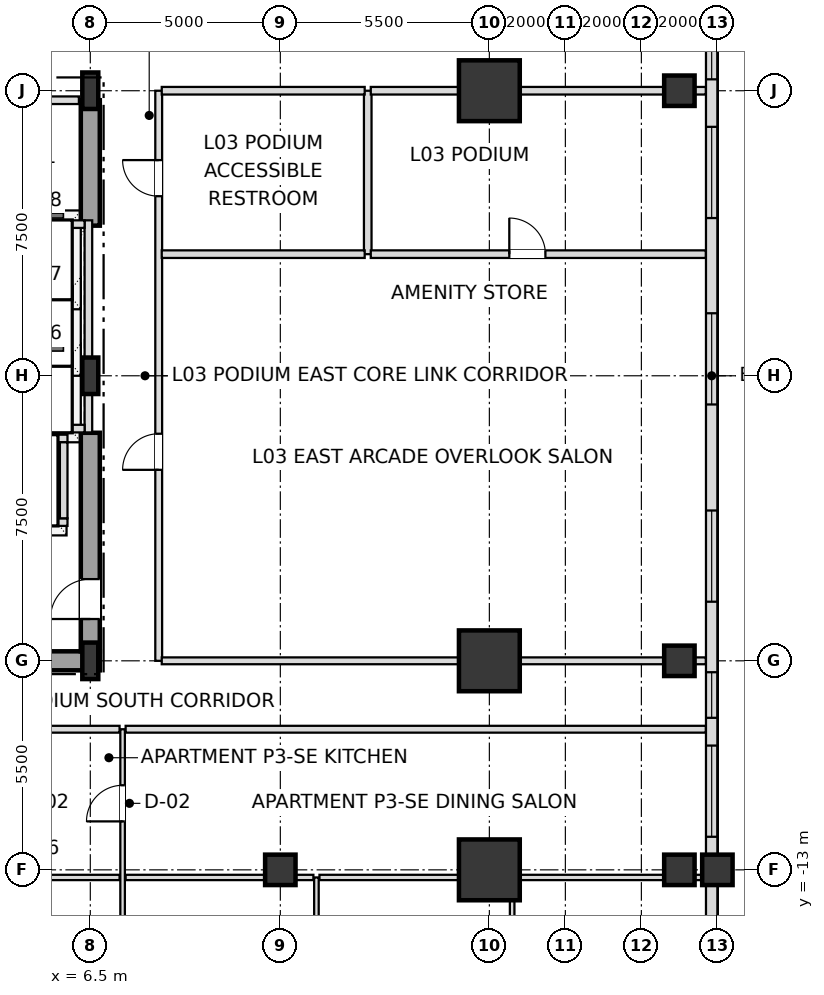
"""IFC4 building model, lengths in metres.
Left out: names, types, materials, properties, quantities, classifications, styles, units other than length and angle.
Written with IfcOpenShell. Run it as: python <this file> out.ifc"""

import sys

from ifc_helpers import new_model, si_unit, direction, frame, frame_2d, origin, origin_2d, place, context, subcontext, project, spatial, rectangle, i_section, extrude, element, fill, save


model = new_model("IFC4")
c1 = context("Model", 3, precision=1e-05, world=origin(), true_north=direction((0.0, 1.0)))
c2 = subcontext(c1, "Body", "Model", "MODEL_VIEW")
j1 = project(units=[si_unit("LENGTHUNIT", "METRE"), si_unit("PLANEANGLEUNIT", "RADIAN")], contexts=[c1])
p1 = place(None, origin())
s1 = spatial("IfcSite", under=j1, at=p1, CompositionType="ELEMENT")
p2 = place(p1, origin())
s2 = spatial("IfcBuilding", under=s1, at=p2, CompositionType="ELEMENT")
p3 = place(p2, frame((0.0, 0.0, 16.8)))
s3 = spatial("IfcBuildingStorey", under=s2, at=p3, CompositionType="ELEMENT", Elevation=16.8)
for number, where, z_axis, x_axis in (
    (1, (6.5, -7.5, 0.0), (0.0, 0.0, 1.0), (1.0, 0.0, 0.0)),
    (2, (6.5, 0.0, 0.0), (0.0, 0.0, 1.0), (1.0, 0.0, 0.0)),
    (3, (6.5, 7.5, 0.0), (0.0, 0.0, 1.0), (1.0, 0.0, 0.0)),
):
    element("IfcColumn", number, at=place(p3, frame(where, z_axis=z_axis, x_axis=x_axis)), inside=s3, PredefinedType="COLUMN", context=c2, shape_type="SweptSolid", body=[
        extrude(i_section(OverallWidth=0.42, OverallDepth=0.96, WebThickness=0.022, FlangeThickness=0.034, at=origin_2d()), origin(), (0.0, 0.0, 1.0), 5.4),
    ])
for number, where, z_axis, x_axis in (
    (4, (17.0, -13.0, 0.0), (0.0, 0.0, 1.0), (1.0, 0.0, 0.0)),
    (5, (17.0, -7.5, 0.0), (0.0, 0.0, 1.0), (1.0, 0.0, 0.0)),
    (6, (17.0, 7.5, 0.0), (0.0, 0.0, 1.0), (1.0, 0.0, 0.0)),
):
    element("IfcColumn", number, at=place(p3, frame(where, z_axis=z_axis, x_axis=x_axis)), inside=s3, PredefinedType="USERDEFINED", context=c2, shape_type="SweptSolid", body=[
        extrude(rectangle(XDim=1.6, YDim=1.6, at=origin_2d()), origin(), (0.0, 0.0, 1.0), 5.4),
    ])
for number, where, z_axis, x_axis in (
    (7, (23.0, -13.0, 0.0), (0.0, 0.0, 1.0), (1.0, 0.0, 0.0)),
    (8, (11.5, -13.0, 0.0), (0.0, 0.0, 1.0), (1.0, 0.0, 0.0)),
    (9, (22.0, -13.0, 0.0), (0.0, 0.0, 1.0), (1.0, 0.0, 0.0)),
    (10, (22.0, -7.5, 0.0), (0.0, 0.0, 1.0), (1.0, 0.0, 0.0)),
    (11, (22.0, 7.5, 0.0), (0.0, 0.0, 1.0), (1.0, 0.0, 0.0)),
):
    element("IfcColumn", number, at=place(p3, frame(where, z_axis=z_axis, x_axis=x_axis)), inside=s3, PredefinedType="COLUMN", context=c2, shape_type="SweptSolid", body=[
        extrude(rectangle(XDim=0.8, YDim=0.8, at=origin_2d()), origin(), (0.0, 0.0, 1.0), 5.4),
    ])
p4 = place(p3, frame((22.85, -19.35, 0.0), z_axis=(0.0, 0.0, 1.0), x_axis=(0.0, 1.0, 0.0)))
e12 = element("IfcWall", 12, at=p4, inside=s3, PredefinedType="SOLIDWALL", context=c2, shape_type="SweptSolid", body=[
    extrude(rectangle(XDim=38.7, YDim=0.3, at=frame_2d((19.35, 0.0))), origin(), (0.0, 0.0, 1.0), 4.476),
])
p5 = place(p4, frame((1.83, 0.0, 0.8)))
e13 = element("IfcOpeningElement", 13, at=p5, cuts=e12, PredefinedType="OPENING", context=c2, shape_type="SweptSolid", body=[
    extrude(rectangle(XDim=2.4, YDim=2.2, at=frame_2d((1.2, 1.1))), frame((0.0, 0.16, 0.0), z_axis=(0.0, -1.0, 0.0), x_axis=(1.0, 0.0, 0.0)), (0.0, 0.0, 1.0), 0.32),
])
p6 = place(p4, frame((7.22, 0.0, 0.8)))
e14 = element("IfcOpeningElement", 14, at=p6, cuts=e12, PredefinedType="OPENING", context=c2, shape_type="SweptSolid", body=[
    extrude(rectangle(XDim=2.4, YDim=2.2, at=frame_2d((1.2, 1.1))), frame((0.0, 0.16, 0.0), z_axis=(0.0, -1.0, 0.0), x_axis=(1.0, 0.0, 0.0)), (0.0, 0.0, 1.0), 0.32),
])
p7 = place(p4, frame((10.35, 0.0, 0.72)))
e15 = element("IfcOpeningElement", 15, at=p7, cuts=e12, PredefinedType="OPENING", context=c2, shape_type="SweptSolid", body=[
    extrude(rectangle(XDim=1.2, YDim=1.68, at=frame_2d((0.6, 0.84))), frame((0.0, 0.16, 0.0), z_axis=(0.0, -1.0, 0.0), x_axis=(1.0, 0.0, 0.0)), (0.0, 0.0, 1.0), 0.32),
])
p8 = place(p4, frame((13.405, 0.0, 0.8)))
e16 = element("IfcOpeningElement", 16, at=p8, cuts=e12, PredefinedType="OPENING", context=c2, shape_type="SweptSolid", body=[
    extrude(rectangle(XDim=2.4, YDim=2.2, at=frame_2d((1.2, 1.1))), frame((0.0, 0.16, 0.0), z_axis=(0.0, -1.0, 0.0), x_axis=(1.0, 0.0, 0.0)), (0.0, 0.0, 1.0), 0.32),
])
p9 = place(p4, frame((18.595, 0.0, 0.8)))
e17 = element("IfcOpeningElement", 17, at=p9, cuts=e12, PredefinedType="OPENING", context=c2, shape_type="SweptSolid", body=[
    extrude(rectangle(XDim=2.4, YDim=2.2, at=frame_2d((1.2, 1.1))), frame((0.0, 0.16, 0.0), z_axis=(0.0, -1.0, 0.0), x_axis=(1.0, 0.0, 0.0)), (0.0, 0.0, 1.0), 0.32),
])
p10 = place(p4, frame((23.5, 0.0, 0.8)))
e18 = element("IfcOpeningElement", 18, at=p10, cuts=e12, PredefinedType="OPENING", context=c2, shape_type="SweptSolid", body=[
    extrude(rectangle(XDim=2.4, YDim=2.2, at=frame_2d((1.2, 1.1))), frame((0.0, 0.16, 0.0), z_axis=(0.0, -1.0, 0.0), x_axis=(1.0, 0.0, 0.0)), (0.0, 0.0, 1.0), 0.32),
])
p11 = place(p4, frame((27.15, 0.0, 0.72)))
e19 = element("IfcOpeningElement", 19, at=p11, cuts=e12, PredefinedType="OPENING", context=c2, shape_type="SweptSolid", body=[
    extrude(rectangle(XDim=1.2, YDim=1.68, at=frame_2d((0.6, 0.84))), frame((0.0, 0.16, 0.0), z_axis=(0.0, -1.0, 0.0), x_axis=(1.0, 0.0, 0.0)), (0.0, 0.0, 1.0), 0.32),
])
p12 = place(p4, frame((29.08, 0.0, 0.8)))
e20 = element("IfcOpeningElement", 20, at=p12, cuts=e12, PredefinedType="OPENING", context=c2, shape_type="SweptSolid", body=[
    extrude(rectangle(XDim=2.4, YDim=2.2, at=frame_2d((1.2, 1.1))), frame((0.0, 0.16, 0.0), z_axis=(0.0, -1.0, 0.0), x_axis=(1.0, 0.0, 0.0)), (0.0, 0.0, 1.0), 0.32),
])
p13 = place(p4, frame((34.47, 0.0, 0.8)))
e21 = element("IfcOpeningElement", 21, at=p13, cuts=e12, PredefinedType="OPENING", context=c2, shape_type="SweptSolid", body=[
    extrude(rectangle(XDim=2.4, YDim=2.2, at=frame_2d((1.2, 1.1))), frame((0.0, 0.16, 0.0), z_axis=(0.0, -1.0, 0.0), x_axis=(1.0, 0.0, 0.0)), (0.0, 0.0, 1.0), 0.32),
])
p14 = place(p3, frame((0.0, -7.5, 0.0), z_axis=(0.0, 0.0, 1.0), x_axis=(1.0, 0.0, 0.0)))
e22 = element("IfcWall", 22, at=p14, inside=s3, PredefinedType="SHEAR", context=c2, shape_type="SweptSolid", body=[
    extrude(rectangle(XDim=6.75, YDim=0.5, at=frame_2d((3.375, 0.0))), origin(), (0.0, 0.0, 1.0), 5.12),
])
p15 = place(p3, frame((6.5, -7.25, 0.0), z_axis=(0.0, 0.0, 1.0), x_axis=(0.0, 1.0, 0.0)))
e23 = element("IfcWall", 23, at=p15, inside=s3, PredefinedType="SHEAR", context=c2, shape_type="SweptSolid", body=[
    extrude(rectangle(XDim=5.75, YDim=0.5, at=frame_2d((2.875, 0.0))), origin(), (0.0, 0.0, 1.0), 5.12),
])
p16 = place(p15, frame((0.85, 0.0, 0.0)))
e24 = element("IfcOpeningElement", 24, at=p16, cuts=e23, PredefinedType="OPENING", context=c2, shape_type="SweptSolid", body=[
    extrude(rectangle(XDim=1.05, YDim=2.15, at=frame_2d((0.525, 1.075))), frame((0.0, 0.26, 0.0), z_axis=(0.0, -1.0, 0.0), x_axis=(1.0, 0.0, 0.0)), (0.0, 0.0, 1.0), 0.52),
])
p17 = place(p3, frame((6.5, 3.95, 0.0), z_axis=(0.0, 0.0, 1.0), x_axis=(0.0, 1.0, 0.0)))
e25 = element("IfcWall", 25, at=p17, inside=s3, PredefinedType="SHEAR", context=c2, shape_type="SweptSolid", body=[
    extrude(rectangle(XDim=3.3, YDim=0.5, at=frame_2d((1.65, 0.0))), origin(), (0.0, 0.0, 1.0), 5.12),
])
p18 = place(p3, frame((6.45, -1.49, 0.0), z_axis=(0.0, 0.0, 1.0), x_axis=(0.0, 1.0, 0.0)))
e26 = element("IfcWall", 26, at=p18, inside=s3, PredefinedType="SOLIDWALL", context=c2, shape_type="SweptSolid", body=[
    extrude(rectangle(XDim=5.58, YDim=0.2, at=frame_2d((2.79, 0.0))), origin(), (0.0, 0.0, 1.0), 4.41),
])
for number, where, z_axis, x_axis in (
    (27, (4.15, -1.39, 0.0), (0.0, 0.0, 1.0), (1.0, 0.0, 0.0)),
    (28, (4.15, 3.99, 0.0), (0.0, 0.0, 1.0), (1.0, 0.0, 0.0)),
):
    element("IfcWall", number, at=place(p3, frame(where, z_axis=z_axis, x_axis=x_axis)), inside=s3, PredefinedType="SOLIDWALL", context=c2, shape_type="SweptSolid", body=[
        extrude(rectangle(XDim=2.2, YDim=0.2, at=frame_2d((1.1, 0.0))), origin(), (0.0, 0.0, 1.0), 5.12),
    ])
p19 = place(p3, frame((1.8, -3.85, 0.0), z_axis=(0.0, 0.0, 1.0), x_axis=(1.0, 0.0, 0.0)))
e29 = element("IfcWall", 29, at=p19, inside=s3, PredefinedType="SOLIDWALL", context=c2, shape_type="SweptSolid", body=[
    extrude(rectangle(XDim=4.1, YDim=0.2, at=frame_2d((2.05, 0.0))), origin(), (0.0, 0.0, 1.0), 5.12),
])
p20 = place(p19, frame((0.45, 0.0, 0.0)))
e30 = element("IfcOpeningElement", 30, at=p20, cuts=e29, PredefinedType="OPENING", context=c2, shape_type="SweptSolid", body=[
    extrude(rectangle(XDim=1.2, YDim=2.2, at=frame_2d((0.6, 1.1))), frame((0.0, 0.11, 0.0), z_axis=(0.0, -1.0, 0.0), x_axis=(1.0, 0.0, 0.0)), (0.0, 0.0, 1.0), 0.22),
])
p21 = place(p19, frame((2.45, 0.0, 0.0)))
e31 = element("IfcOpeningElement", 31, at=p21, cuts=e29, PredefinedType="OPENING", context=c2, shape_type="SweptSolid", body=[
    extrude(rectangle(XDim=1.2, YDim=2.2, at=frame_2d((0.6, 1.1))), frame((0.0, 0.11, 0.0), z_axis=(0.0, -1.0, 0.0), x_axis=(1.0, 0.0, 0.0)), (0.0, 0.0, 1.0), 0.22),
])
p22 = place(p3, frame((1.8, -1.65, 0.0), z_axis=(0.0, 0.0, 1.0), x_axis=(1.0, 0.0, 0.0)))
e32 = element("IfcWall", 32, at=p22, inside=s3, PredefinedType="SOLIDWALL", context=c2, shape_type="SweptSolid", body=[
    extrude(rectangle(XDim=4.1, YDim=0.2, at=frame_2d((2.05, 0.0))), origin(), (0.0, 0.0, 1.0), 5.12),
])
p23 = place(p3, frame((5.8, -3.75, 0.0), z_axis=(0.0, 0.0, 1.0), x_axis=(0.0, 1.0, 0.0)))
e33 = element("IfcWall", 33, at=p23, inside=s3, PredefinedType="SOLIDWALL", context=c2, shape_type="SweptSolid", body=[
    extrude(rectangle(XDim=2.0, YDim=0.2, at=frame_2d((1.0, 0.0))), origin(), (0.0, 0.0, 1.0), 5.12),
])
p24 = place(p3, frame((7.35, -19.22, 0.0), z_axis=(0.0, 0.0, 1.0), x_axis=(0.0, 1.0, 0.0)))
e34 = element("IfcWall", 34, at=p24, inside=s3, PredefinedType="PARTITIONING", context=c2, shape_type="SweptSolid", body=[
    extrude(rectangle(XDim=9.92, YDim=0.12, at=frame_2d((4.96, 0.0))), origin(), (0.0, 0.0, 1.0), 4.41),
])
p25 = place(p24, frame((7.495, 0.0, 0.0)))
e35 = element("IfcOpeningElement", 35, at=p25, cuts=e34, PredefinedType="OPENING", context=c2, shape_type="SweptSolid", body=[
    extrude(rectangle(XDim=0.95, YDim=2.1, at=frame_2d((0.475, 1.05))), frame((0.0, 0.07, 0.0), z_axis=(0.0, -1.0, 0.0), x_axis=(1.0, 0.0, 0.0)), (0.0, 0.0, 1.0), 0.14),
])
p26 = place(p24, frame((2.57, 0.0, 0.0)))
e36 = element("IfcOpeningElement", 36, at=p26, cuts=e34, PredefinedType="OPENING", context=c2, shape_type="SweptSolid", body=[
    extrude(rectangle(XDim=0.9, YDim=2.1, at=frame_2d((0.45, 1.05))), frame((0.0, 0.07, 0.0), z_axis=(0.0, -1.0, 0.0), x_axis=(1.0, 0.0, 0.0)), (0.0, 0.0, 1.0), 0.14),
])
p27 = place(p3, frame((8.3, -7.5, 0.0), z_axis=(0.0, 0.0, 1.0), x_axis=(0.0, 1.0, 0.0)))
e37 = element("IfcWall", 37, at=p27, inside=s3, PredefinedType="PARTITIONING", context=c2, shape_type="SweptSolid", body=[
    extrude(rectangle(XDim=15.0, YDim=0.18, at=frame_2d((7.5, 0.0))), origin(), (0.0, 0.0, 1.0), 5.12),
])
p28 = place(p27, frame((5.025, 0.0, 0.0)))
e38 = element("IfcOpeningElement", 38, at=p28, cuts=e37, PredefinedType="OPENING", context=c2, shape_type="SweptSolid", body=[
    extrude(rectangle(XDim=0.95, YDim=2.15, at=frame_2d((0.475, 1.075))), frame((0.0, 0.1, 0.0), z_axis=(0.0, -1.0, 0.0), x_axis=(1.0, 0.0, 0.0)), (0.0, 0.0, 1.0), 0.2),
])
p29 = place(p27, frame((12.225, 0.0, 0.0)))
e39 = element("IfcOpeningElement", 39, at=p29, cuts=e37, PredefinedType="OPENING", context=c2, shape_type="SweptSolid", body=[
    extrude(rectangle(XDim=0.95, YDim=2.15, at=frame_2d((0.475, 1.075))), frame((0.0, 0.1, 0.0), z_axis=(0.0, -1.0, 0.0), x_axis=(1.0, 0.0, 0.0)), (0.0, 0.0, 1.0), 0.2),
])
p30 = place(p3, frame((12.45, -19.195, 0.0), z_axis=(0.0, 0.0, 1.0), x_axis=(0.0, 1.0, 0.0)))
e40 = element("IfcWall", 40, at=p30, inside=s3, PredefinedType="PARTITIONING", context=c2, shape_type="SweptSolid", body=[
    extrude(rectangle(XDim=5.995, YDim=0.12, at=frame_2d((2.998, 0.0))), origin(), (0.0, 0.0, 1.0), 5.12),
])
p31 = place(p30, frame((2.545, 0.0, 0.0)))
e41 = element("IfcOpeningElement", 41, at=p31, cuts=e40, PredefinedType="OPENING", context=c2, shape_type="SweptSolid", body=[
    extrude(rectangle(XDim=0.9, YDim=2.1, at=frame_2d((0.45, 1.05))), frame((0.0, 0.07, 0.0), z_axis=(0.0, -1.0, 0.0), x_axis=(1.0, 0.0, 0.0)), (0.0, 0.0, 1.0), 0.14),
])
p32 = place(p3, frame((13.8, 3.2, 0.0), z_axis=(0.0, 0.0, 1.0), x_axis=(0.0, 1.0, 0.0)))
e42 = element("IfcWall", 42, at=p32, inside=s3, PredefinedType="SOLIDWALL", context=c2, shape_type="SweptSolid", body=[
    extrude(rectangle(XDim=4.3, YDim=0.2, at=frame_2d((2.15, 0.0))), origin(), (0.0, 0.0, 1.0), 5.12),
])
p33 = place(p3, frame((17.6, -19.195, 0.0), z_axis=(0.0, 0.0, 1.0), x_axis=(0.0, 1.0, 0.0)))
e43 = element("IfcWall", 43, at=p33, inside=s3, PredefinedType="PARTITIONING", context=c2, shape_type="SweptSolid", body=[
    extrude(rectangle(XDim=5.995, YDim=0.12, at=frame_2d((2.998, 0.0))), origin(), (0.0, 0.0, 1.0), 5.12),
])
p34 = place(p33, frame((2.545, 0.0, 0.0)))
e44 = element("IfcOpeningElement", 44, at=p34, cuts=e43, PredefinedType="OPENING", context=c2, shape_type="SweptSolid", body=[
    extrude(rectangle(XDim=0.9, YDim=2.1, at=frame_2d((0.45, 1.05))), frame((0.0, 0.07, 0.0), z_axis=(0.0, -1.0, 0.0), x_axis=(1.0, 0.0, 0.0)), (0.0, 0.0, 1.0), 0.14),
])
p35 = place(p3, frame((4.23, -13.2, 0.0), z_axis=(0.0, 0.0, 1.0), x_axis=(1.0, 0.0, 0.0)))
e45 = element("IfcWall", 45, at=p35, inside=s3, PredefinedType="PARTITIONING", context=c2, shape_type="SweptSolid", body=[
    extrude(rectangle(XDim=3.04, YDim=0.14, at=frame_2d((1.52, 0.0))), origin(), (0.0, 0.0, 1.0), 4.41),
])
p36 = place(p3, frame((7.43, -13.2, 0.0), z_axis=(0.0, 0.0, 1.0), x_axis=(1.0, 0.0, 0.0)))
e46 = element("IfcWall", 46, at=p36, inside=s3, PredefinedType="PARTITIONING", context=c2, shape_type="SweptSolid", body=[
    extrude(rectangle(XDim=4.94, YDim=0.14, at=frame_2d((2.47, 0.0))), origin(), (0.0, 0.0, 1.0), 4.41),
])
p37 = place(p3, frame((12.53, -13.2, 0.0), z_axis=(0.0, 0.0, 1.0), x_axis=(1.0, 0.0, 0.0)))
e47 = element("IfcWall", 47, at=p37, inside=s3, PredefinedType="PARTITIONING", context=c2, shape_type="SweptSolid", body=[
    extrude(rectangle(XDim=4.99, YDim=0.14, at=frame_2d((2.495, 0.0))), origin(), (0.0, 0.0, 1.0), 4.41),
])
p38 = place(p3, frame((17.68, -13.2, 0.0), z_axis=(0.0, 0.0, 1.0), x_axis=(1.0, 0.0, 0.0)))
e48 = element("IfcWall", 48, at=p38, inside=s3, PredefinedType="PARTITIONING", context=c2, shape_type="SweptSolid", body=[
    extrude(rectangle(XDim=5.015, YDim=0.14, at=frame_2d((2.508, 0.0))), origin(), (0.0, 0.0, 1.0), 5.12),
])
p39 = place(p3, frame((4.23, -9.3, 0.0), z_axis=(0.0, 0.0, 1.0), x_axis=(1.0, 0.0, 0.0)))
e49 = element("IfcWall", 49, at=p39, inside=s3, PredefinedType="PARTITIONING", context=c2, shape_type="SweptSolid", body=[
    extrude(rectangle(XDim=3.04, YDim=0.18, at=frame_2d((1.52, 0.0))), origin(), (0.0, 0.0, 1.0), 4.41),
])
p40 = place(p3, frame((7.43, -9.3, 0.0), z_axis=(0.0, 0.0, 1.0), x_axis=(1.0, 0.0, 0.0)))
e50 = element("IfcWall", 50, at=p40, inside=s3, PredefinedType="PARTITIONING", context=c2, shape_type="SweptSolid", body=[
    extrude(rectangle(XDim=15.265, YDim=0.18, at=frame_2d((7.633, 0.0))), origin(), (0.0, 0.0, 1.0), 4.41),
])
p41 = place(p3, frame((8.38, -7.5, 0.0), z_axis=(0.0, 0.0, 1.0), x_axis=(1.0, 0.0, 0.0)))
e51 = element("IfcWall", 51, at=p41, inside=s3, PredefinedType="PARTITIONING", context=c2, shape_type="SweptSolid", body=[
    extrude(rectangle(XDim=14.315, YDim=0.18, at=frame_2d((7.158, 0.0))), origin(), (0.0, 0.0, 1.0), 4.41),
])
p42 = place(p3, frame((8.38, 3.2, 0.0), z_axis=(0.0, 0.0, 1.0), x_axis=(1.0, 0.0, 0.0)))
e52 = element("IfcWall", 52, at=p42, inside=s3, PredefinedType="SOLIDWALL", context=c2, shape_type="SweptSolid", body=[
    extrude(rectangle(XDim=5.34, YDim=0.2, at=frame_2d((2.67, 0.0))), origin(), (0.0, 0.0, 1.0), 4.642),
])
p43 = place(p3, frame((13.88, 3.2, 0.0), z_axis=(0.0, 0.0, 1.0), x_axis=(1.0, 0.0, 0.0)))
e53 = element("IfcWall", 53, at=p43, inside=s3, PredefinedType="SOLIDWALL", context=c2, shape_type="SweptSolid", body=[
    extrude(rectangle(XDim=8.815, YDim=0.2, at=frame_2d((4.408, 0.0))), origin(), (0.0, 0.0, 1.0), 4.41),
])
p44 = place(p43, frame((3.645, 0.0, 0.0)))
e54 = element("IfcOpeningElement", 54, at=p44, cuts=e53, PredefinedType="OPENING", context=c2, shape_type="SweptSolid", body=[
    extrude(rectangle(XDim=0.95, YDim=2.15, at=frame_2d((0.475, 1.075))), frame((0.0, 0.11, 0.0), z_axis=(0.0, -1.0, 0.0), x_axis=(1.0, 0.0, 0.0)), (0.0, 0.0, 1.0), 0.22),
])
p45 = place(p3, frame((4.13, 7.25, 0.0), z_axis=(0.0, 0.0, 1.0), x_axis=(1.0, 0.0, 0.0)))
e55 = element("IfcWall", 55, at=p45, inside=s3, PredefinedType="SOLIDWALL", context=c2, shape_type="SweptSolid", body=[
    extrude(rectangle(XDim=2.07, YDim=0.2, at=frame_2d((1.035, 0.0))), origin(), (0.0, 0.0, 1.0), 4.41),
])
p46 = place(p3, frame((8.38, 7.5, 0.0), z_axis=(0.0, 0.0, 1.0), x_axis=(1.0, 0.0, 0.0)))
e56 = element("IfcWall", 56, at=p46, inside=s3, PredefinedType="SOLIDWALL", context=c2, shape_type="SweptSolid", body=[
    extrude(rectangle(XDim=5.34, YDim=0.2, at=frame_2d((2.67, 0.0))), origin(), (0.0, 0.0, 1.0), 4.41),
])
p47 = place(p3, frame((13.88, 7.5, 0.0), z_axis=(0.0, 0.0, 1.0), x_axis=(1.0, 0.0, 0.0)))
e57 = element("IfcWall", 57, at=p47, inside=s3, PredefinedType="SOLIDWALL", context=c2, shape_type="SweptSolid", body=[
    extrude(rectangle(XDim=8.815, YDim=0.2, at=frame_2d((4.408, 0.0))), origin(), (0.0, 0.0, 1.0), 4.41),
])
p48 = place(p6, origin())
e58 = element("IfcWindow", 58, at=p48, inside=s3, PartitioningType="SINGLE_PANEL", PredefinedType="WINDOW", context=c2, shape_type="SweptSolid", body=[
    extrude(rectangle(XDim=2.4, YDim=2.2, at=frame_2d((1.2, 1.1))), frame((0.0, 0.03, 0.0), z_axis=(0.0, -1.0, 0.0), x_axis=(1.0, 0.0, 0.0)), (0.0, 0.0, 1.0), 0.06),
])
fill(e14, e58)
p49 = place(p7, origin())
e59 = element("IfcWindow", 59, at=p49, inside=s3, PartitioningType="SINGLE_PANEL", PredefinedType="WINDOW", context=c2, shape_type="SweptSolid", body=[
    extrude(rectangle(XDim=1.2, YDim=1.68, at=frame_2d((0.6, 0.84))), frame((0.0, 0.03, 0.0), z_axis=(0.0, -1.0, 0.0), x_axis=(1.0, 0.0, 0.0)), (0.0, 0.0, 1.0), 0.06),
])
fill(e15, e59)
p50 = place(p8, origin())
e60 = element("IfcWindow", 60, at=p50, inside=s3, PartitioningType="SINGLE_PANEL", PredefinedType="WINDOW", context=c2, shape_type="SweptSolid", body=[
    extrude(rectangle(XDim=2.4, YDim=2.2, at=frame_2d((1.2, 1.1))), frame((0.0, 0.03, 0.0), z_axis=(0.0, -1.0, 0.0), x_axis=(1.0, 0.0, 0.0)), (0.0, 0.0, 1.0), 0.06),
])
fill(e16, e60)
p51 = place(p9, origin())
e61 = element("IfcWindow", 61, at=p51, inside=s3, PartitioningType="SINGLE_PANEL", PredefinedType="WINDOW", context=c2, shape_type="SweptSolid", body=[
    extrude(rectangle(XDim=2.4, YDim=2.2, at=frame_2d((1.2, 1.1))), frame((0.0, 0.03, 0.0), z_axis=(0.0, -1.0, 0.0), x_axis=(1.0, 0.0, 0.0)), (0.0, 0.0, 1.0), 0.06),
])
fill(e17, e61)
p52 = place(p10, origin())
e62 = element("IfcWindow", 62, at=p52, inside=s3, PartitioningType="SINGLE_PANEL", PredefinedType="WINDOW", context=c2, shape_type="SweptSolid", body=[
    extrude(rectangle(XDim=2.4, YDim=2.2, at=frame_2d((1.2, 1.1))), frame((0.0, 0.03, 0.0), z_axis=(0.0, -1.0, 0.0), x_axis=(1.0, 0.0, 0.0)), (0.0, 0.0, 1.0), 0.06),
])
fill(e18, e62)
p53 = place(p11, origin())
e63 = element("IfcWindow", 63, at=p53, inside=s3, PartitioningType="SINGLE_PANEL", PredefinedType="WINDOW", context=c2, shape_type="SweptSolid", body=[
    extrude(rectangle(XDim=1.2, YDim=1.68, at=frame_2d((0.6, 0.84))), frame((0.0, 0.03, 0.0), z_axis=(0.0, -1.0, 0.0), x_axis=(1.0, 0.0, 0.0)), (0.0, 0.0, 1.0), 0.06),
])
fill(e19, e63)
p54 = place(p16, origin())
e64 = element("IfcDoor", 64, at=p54, inside=s3, OperationType="SINGLE_SWING_LEFT", PredefinedType="DOOR", context=c2, shape_type="SweptSolid", body=[
    extrude(rectangle(XDim=1.05, YDim=2.15, at=frame_2d((0.525, 1.075))), frame((0.0, 0.025, 0.0), z_axis=(0.0, -1.0, 0.0), x_axis=(1.0, 0.0, 0.0)), (0.0, 0.0, 1.0), 0.05),
])
fill(e24, e64)
p55 = place(p25, origin())
e65 = element("IfcDoor", 65, at=p55, inside=s3, OperationType="SINGLE_SWING_LEFT", PredefinedType="DOOR", context=c2, shape_type="SweptSolid", body=[
    extrude(rectangle(XDim=0.95, YDim=2.1, at=frame_2d((0.475, 1.05))), frame((0.0, 0.025, 0.0), z_axis=(0.0, -1.0, 0.0), x_axis=(1.0, 0.0, 0.0)), (0.0, 0.0, 1.0), 0.05),
])
fill(e35, e65)
p56 = place(p28, origin())
e66 = element("IfcDoor", 66, at=p56, inside=s3, OperationType="SINGLE_SWING_LEFT", PredefinedType="DOOR", context=c2, shape_type="SweptSolid", body=[
    extrude(rectangle(XDim=0.95, YDim=2.15, at=frame_2d((0.475, 1.075))), frame((0.0, 0.025, 0.0), z_axis=(0.0, -1.0, 0.0), x_axis=(1.0, 0.0, 0.0)), (0.0, 0.0, 1.0), 0.05),
])
fill(e38, e66)
p57 = place(p29, origin())
e67 = element("IfcDoor", 67, at=p57, inside=s3, OperationType="SINGLE_SWING_RIGHT", PredefinedType="DOOR", context=c2, shape_type="SweptSolid", body=[
    extrude(rectangle(XDim=0.95, YDim=2.15, at=frame_2d((0.475, 1.075))), frame((0.0, 0.025, 0.0), z_axis=(0.0, -1.0, 0.0), x_axis=(1.0, 0.0, 0.0)), (0.0, 0.0, 1.0), 0.05),
])
fill(e39, e67)
p58 = place(p44, origin())
e68 = element("IfcDoor", 68, at=p58, inside=s3, OperationType="SINGLE_SWING_LEFT", PredefinedType="DOOR", context=c2, shape_type="SweptSolid", body=[
    extrude(rectangle(XDim=0.95, YDim=2.15, at=frame_2d((0.475, 1.075))), frame((0.0, 0.025, 0.0), z_axis=(0.0, -1.0, 0.0), x_axis=(1.0, 0.0, 0.0)), (0.0, 0.0, 1.0), 0.05),
])
fill(e54, e68)
save(model, sys.argv[1])
